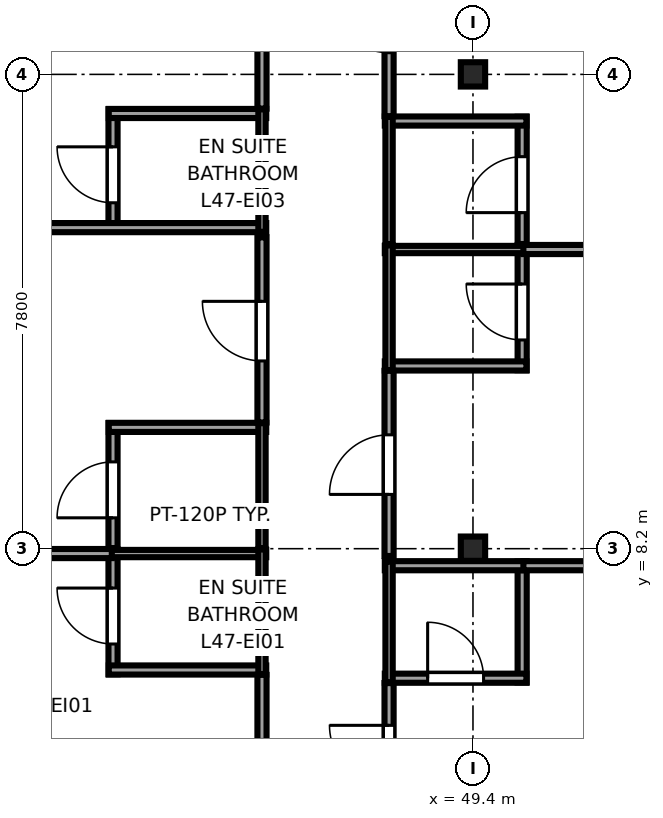
"""IFC4 building model, lengths in metres.
Left out: names, types, materials, properties, quantities, classifications, styles, units other than length and angle.
Written with IfcOpenShell. Run it as: python <this file> out.ifc"""

import sys

from ifc_helpers import new_model, si_unit, direction, frame, frame_2d, origin, origin_2d, place, context, subcontext, project, spatial, rectangle, i_section, extrude, source, transform, mapped, element, fill, save


model = new_model("IFC4")
c1 = context("Model", 3, precision=1e-05, world=origin(), true_north=direction((0.0, 1.0)))
c2 = subcontext(c1, "Body", "Model", "MODEL_VIEW")
j1 = project(units=[si_unit("LENGTHUNIT", "METRE"), si_unit("PLANEANGLEUNIT", "RADIAN")], contexts=[c1])
p1 = place(None, origin())
s1 = spatial("IfcSite", under=j1, at=p1, CompositionType="ELEMENT")
p2 = place(p1, origin())
s2 = spatial("IfcBuilding", under=s1, at=p2, CompositionType="ELEMENT")
p3 = place(p2, frame((0.0, 0.0, 179.0)))
s3 = spatial("IfcBuildingStorey", under=s2, at=p3, CompositionType="ELEMENT", Elevation=179.0)
m1 = source(origin(), c2, "Body", "SweptSolid", [
    extrude(i_section(OverallWidth=0.4, OverallDepth=0.4, WebThickness=0.02, FlangeThickness=0.035, at=origin_2d()), origin(), (0.0, 0.0, 1.0), 3.55),
])
for number, where, z_axis, x_axis in (
    (1, (49.4, 8.2, 0.0), (0.0, 0.0, 1.0), (1.0, 0.0, 0.0)),
    (2, (49.4, 16.0, 0.0), (0.0, 0.0, 1.0), (1.0, 0.0, 0.0)),
):
    element("IfcColumn", number, at=place(p3, frame(where, z_axis=z_axis, x_axis=x_axis)), inside=s3, PredefinedType="COLUMN", context=c2, shape_type="MappedRepresentation", body=[
        mapped(m1, transform((0.0, 0.0, 0.0), x_axis=(1.0, 0.0, 0.0), y_axis=(0.0, 1.0, 0.0), z_axis=(0.0, 0.0, 1.0), scale=1.0)),
    ])
p4 = place(p3, frame((43.48, 6.135, 0.0), z_axis=(0.0, 0.0, 1.0), x_axis=(0.0, 1.0, 0.0)))
e3 = element("IfcWall", 3, at=p4, inside=s3, PredefinedType="PARTITIONING", context=c2, shape_type="SweptSolid", body=[
    extrude(rectangle(XDim=2.055, YDim=0.15, at=frame_2d((1.027, 0.0))), origin(), (0.0, 0.0, 1.0), 3.25),
])
p5 = place(p4, frame((0.498, 0.0, 0.0)))
e4 = element("IfcOpeningElement", 4, at=p5, cuts=e3, PredefinedType="OPENING", context=c2, shape_type="SweptSolid", body=[
    extrude(rectangle(XDim=0.92, YDim=2.01, at=frame_2d((0.46, 1.005))), frame((0.0, 0.085, 0.0), z_axis=(0.0, -1.0, 0.0), x_axis=(1.0, 0.0, 0.0)), (0.0, 0.0, 1.0), 0.17),
])
p6 = place(p3, frame((43.41, 6.205, 0.0), z_axis=(0.0, 0.0, 1.0), x_axis=(1.0, 0.0, 0.0)))
e5 = element("IfcWall", 5, at=p6, inside=s3, PredefinedType="PARTITIONING", context=c2, shape_type="SweptSolid", body=[
    extrude(rectangle(XDim=2.59, YDim=0.15, at=frame_2d((1.295, 0.0))), origin(), (0.0, 0.0, 1.0), 3.25),
])
p7 = place(p3, frame((43.41, 8.12, 0.0), z_axis=(0.0, 0.0, 1.0), x_axis=(1.0, 0.0, 0.0)))
e6 = element("IfcWall", 6, at=p7, inside=s3, PredefinedType="PLUMBINGWALL", context=c2, shape_type="SweptSolid", body=[
    extrude(rectangle(XDim=2.59, YDim=0.12, at=frame_2d((1.295, 0.0))), origin(), (0.0, 0.0, 1.0), 2.638),
])
p8 = place(p3, frame((45.93, 6.135, 0.0), z_axis=(0.0, 0.0, 1.0), x_axis=(0.0, 1.0, 0.0)))
e7 = element("IfcWall", 7, at=p8, inside=s3, PredefinedType="PLUMBINGWALL", context=c2, shape_type="SweptSolid", body=[
    extrude(rectangle(XDim=2.055, YDim=0.12, at=frame_2d((1.027, 0.0))), origin(), (0.0, 0.0, 1.0), 3.25),
])
p9 = place(p3, frame((43.48, 8.21, 0.0), z_axis=(0.0, 0.0, 1.0), x_axis=(0.0, 1.0, 0.0)))
e8 = element("IfcWall", 8, at=p9, inside=s3, PredefinedType="PARTITIONING", context=c2, shape_type="SweptSolid", body=[
    extrude(rectangle(XDim=2.055, YDim=0.15, at=frame_2d((1.027, 0.0))), origin(), (0.0, 0.0, 1.0), 3.25),
])
p10 = place(p9, frame((0.498, 0.0, 0.0)))
e9 = element("IfcOpeningElement", 9, at=p10, cuts=e8, PredefinedType="OPENING", context=c2, shape_type="SweptSolid", body=[
    extrude(rectangle(XDim=0.92, YDim=2.01, at=frame_2d((0.46, 1.005))), frame((0.0, 0.085, 0.0), z_axis=(0.0, -1.0, 0.0), x_axis=(1.0, 0.0, 0.0)), (0.0, 0.0, 1.0), 0.17),
])
p11 = place(p3, frame((43.41, 10.195, 0.0), z_axis=(0.0, 0.0, 1.0), x_axis=(1.0, 0.0, 0.0)))
e10 = element("IfcWall", 10, at=p11, inside=s3, PredefinedType="PARTITIONING", context=c2, shape_type="SweptSolid", body=[
    extrude(rectangle(XDim=2.59, YDim=0.15, at=frame_2d((1.295, 0.0))), origin(), (0.0, 0.0, 1.0), 3.25),
])
p12 = place(p3, frame((45.93, 8.21, 0.0), z_axis=(0.0, 0.0, 1.0), x_axis=(0.0, 1.0, 0.0)))
e11 = element("IfcWall", 11, at=p12, inside=s3, PredefinedType="PLUMBINGWALL", context=c2, shape_type="SweptSolid", body=[
    extrude(rectangle(XDim=2.055, YDim=0.12, at=frame_2d((1.027, 0.0))), origin(), (0.0, 0.0, 1.0), 3.25),
])
p13 = place(p3, frame((43.48, 13.41, 0.0), z_axis=(0.0, 0.0, 1.0), x_axis=(0.0, 1.0, 0.0)))
e12 = element("IfcWall", 12, at=p13, inside=s3, PredefinedType="PARTITIONING", context=c2, shape_type="SweptSolid", body=[
    extrude(rectangle(XDim=2.017, YDim=0.15, at=frame_2d((1.009, 0.0))), origin(), (0.0, 0.0, 1.0), 3.25),
])
p14 = place(p13, frame((0.479, 0.0, 0.0)))
e13 = element("IfcOpeningElement", 13, at=p14, cuts=e12, PredefinedType="OPENING", context=c2, shape_type="SweptSolid", body=[
    extrude(rectangle(XDim=0.92, YDim=2.01, at=frame_2d((0.46, 1.005))), frame((0.0, 0.085, 0.0), z_axis=(0.0, -1.0, 0.0), x_axis=(1.0, 0.0, 0.0)), (0.0, 0.0, 1.0), 0.17),
])
p15 = place(p3, frame((34.65, 13.48, 0.0), z_axis=(0.0, 0.0, 1.0), x_axis=(1.0, 0.0, 0.0)))
e14 = element("IfcWall", 14, at=p15, inside=s3, PredefinedType="PARTITIONING", context=c2, shape_type="SweptSolid", body=[
    extrude(rectangle(XDim=11.35, YDim=0.15, at=frame_2d((5.675, 0.0))), origin(), (0.0, 0.0, 1.0), 3.25),
])
p16 = place(p3, frame((43.41, 15.357, 0.0), z_axis=(0.0, 0.0, 1.0), x_axis=(1.0, 0.0, 0.0)))
e15 = element("IfcWall", 15, at=p16, inside=s3, PredefinedType="PARTITIONING", context=c2, shape_type="SweptSolid", body=[
    extrude(rectangle(XDim=2.59, YDim=0.15, at=frame_2d((1.295, 0.0))), origin(), (0.0, 0.0, 1.0), 3.25),
])
p17 = place(p3, frame((45.93, 13.41, 0.0), z_axis=(0.0, 0.0, 1.0), x_axis=(0.0, 1.0, 0.0)))
e16 = element("IfcWall", 16, at=p17, inside=s3, PredefinedType="PLUMBINGWALL", context=c2, shape_type="SweptSolid", body=[
    extrude(rectangle(XDim=2.017, YDim=0.12, at=frame_2d((1.009, 0.0))), origin(), (0.0, 0.0, 1.0), 3.25),
])
p18 = place(p3, frame((50.209, 6.0, 0.0), z_axis=(0.0, 0.0, 1.0), x_axis=(0.0, 1.0, 0.0)))
e17 = element("IfcWall", 17, at=p18, inside=s3, PredefinedType="PARTITIONING", context=c2, shape_type="SweptSolid", body=[
    extrude(rectangle(XDim=1.99, YDim=0.15, at=frame_2d((0.995, 0.0))), origin(), (0.0, 0.0, 1.0), 3.25),
])
p19 = place(p3, frame((47.95, 6.07, 0.0), z_axis=(0.0, 0.0, 1.0), x_axis=(1.0, 0.0, 0.0)))
e18 = element("IfcWall", 18, at=p19, inside=s3, PredefinedType="PARTITIONING", context=c2, shape_type="SweptSolid", body=[
    extrude(rectangle(XDim=2.329, YDim=0.15, at=frame_2d((1.165, 0.0))), origin(), (0.0, 0.0, 1.0), 3.25),
])
p20 = place(p19, frame((0.705, 0.0, 0.0)))
e19 = element("IfcOpeningElement", 19, at=p20, cuts=e18, PredefinedType="OPENING", context=c2, shape_type="SweptSolid", body=[
    extrude(rectangle(XDim=0.92, YDim=2.01, at=frame_2d((0.46, 1.005))), frame((0.0, 0.085, 0.0), z_axis=(0.0, -1.0, 0.0), x_axis=(1.0, 0.0, 0.0)), (0.0, 0.0, 1.0), 0.17),
])
p21 = place(p3, frame((47.95, 7.92, 0.0), z_axis=(0.0, 0.0, 1.0), x_axis=(1.0, 0.0, 0.0)))
e20 = element("IfcWall", 20, at=p21, inside=s3, PredefinedType="PARTITIONING", context=c2, shape_type="SweptSolid", body=[
    extrude(rectangle(XDim=2.329, YDim=0.15, at=frame_2d((1.165, 0.0))), origin(), (0.0, 0.0, 1.0), 3.25),
])
p22 = place(p3, frame((48.02, 6.0, 0.0), z_axis=(0.0, 0.0, 1.0), x_axis=(0.0, 1.0, 0.0)))
e21 = element("IfcWall", 21, at=p22, inside=s3, PredefinedType="PLUMBINGWALL", context=c2, shape_type="SweptSolid", body=[
    extrude(rectangle(XDim=1.99, YDim=0.12, at=frame_2d((0.995, 0.0))), origin(), (0.0, 0.0, 1.0), 3.25),
])
p23 = place(p3, frame((50.209, 11.135, 0.0), z_axis=(0.0, 0.0, 1.0), x_axis=(0.0, 1.0, 0.0)))
e22 = element("IfcWall", 22, at=p23, inside=s3, PredefinedType="PARTITIONING", context=c2, shape_type="SweptSolid", body=[
    extrude(rectangle(XDim=2.055, YDim=0.15, at=frame_2d((1.027, 0.0))), origin(), (0.0, 0.0, 1.0), 3.25),
])
p24 = place(p23, frame((0.498, 0.0, 0.0)))
e23 = element("IfcOpeningElement", 23, at=p24, cuts=e22, PredefinedType="OPENING", context=c2, shape_type="SweptSolid", body=[
    extrude(rectangle(XDim=0.92, YDim=2.01, at=frame_2d((0.46, 1.005))), frame((0.0, 0.085, 0.0), z_axis=(0.0, -1.0, 0.0), x_axis=(1.0, 0.0, 0.0)), (0.0, 0.0, 1.0), 0.17),
])
p25 = place(p3, frame((47.95, 11.205, 0.0), z_axis=(0.0, 0.0, 1.0), x_axis=(1.0, 0.0, 0.0)))
e24 = element("IfcWall", 24, at=p25, inside=s3, PredefinedType="PARTITIONING", context=c2, shape_type="SweptSolid", body=[
    extrude(rectangle(XDim=2.329, YDim=0.15, at=frame_2d((1.165, 0.0))), origin(), (0.0, 0.0, 1.0), 3.25),
])
p26 = place(p3, frame((47.95, 13.12, 0.0), z_axis=(0.0, 0.0, 1.0), x_axis=(1.0, 0.0, 0.0)))
e25 = element("IfcWall", 25, at=p26, inside=s3, PredefinedType="PLUMBINGWALL", context=c2, shape_type="SweptSolid", body=[
    extrude(rectangle(XDim=2.329, YDim=0.12, at=frame_2d((1.165, 0.0))), origin(), (0.0, 0.0, 1.0), 3.25),
])
p27 = place(p3, frame((48.02, 11.135, 0.0), z_axis=(0.0, 0.0, 1.0), x_axis=(0.0, 1.0, 0.0)))
e26 = element("IfcWall", 26, at=p27, inside=s3, PredefinedType="PLUMBINGWALL", context=c2, shape_type="SweptSolid", body=[
    extrude(rectangle(XDim=2.055, YDim=0.12, at=frame_2d((1.027, 0.0))), origin(), (0.0, 0.0, 1.0), 3.25),
])
p28 = place(p3, frame((50.209, 13.21, 0.0), z_axis=(0.0, 0.0, 1.0), x_axis=(0.0, 1.0, 0.0)))
e27 = element("IfcWall", 27, at=p28, inside=s3, PredefinedType="PARTITIONING", context=c2, shape_type="SweptSolid", body=[
    extrude(rectangle(XDim=2.093, YDim=0.15, at=frame_2d((1.046, 0.0))), origin(), (0.0, 0.0, 1.0), 3.25),
])
p29 = place(p28, frame((0.517, 0.0, 0.0)))
e28 = element("IfcOpeningElement", 28, at=p29, cuts=e27, PredefinedType="OPENING", context=c2, shape_type="SweptSolid", body=[
    extrude(rectangle(XDim=0.92, YDim=2.01, at=frame_2d((0.46, 1.005))), frame((0.0, 0.085, 0.0), z_axis=(0.0, -1.0, 0.0), x_axis=(1.0, 0.0, 0.0)), (0.0, 0.0, 1.0), 0.17),
])
p30 = place(p3, frame((47.95, 15.233, 0.0), z_axis=(0.0, 0.0, 1.0), x_axis=(1.0, 0.0, 0.0)))
e29 = element("IfcWall", 29, at=p30, inside=s3, PredefinedType="PARTITIONING", context=c2, shape_type="SweptSolid", body=[
    extrude(rectangle(XDim=2.329, YDim=0.15, at=frame_2d((1.165, 0.0))), origin(), (0.0, 0.0, 1.0), 3.25),
])
p31 = place(p3, frame((48.02, 13.21, 0.0), z_axis=(0.0, 0.0, 1.0), x_axis=(0.0, 1.0, 0.0)))
e30 = element("IfcWall", 30, at=p31, inside=s3, PredefinedType="PLUMBINGWALL", context=c2, shape_type="SweptSolid", body=[
    extrude(rectangle(XDim=2.093, YDim=0.12, at=frame_2d((1.046, 0.0))), origin(), (0.0, 0.0, 1.0), 3.25),
])
p32 = place(p3, frame((45.93, 3.005, 0.0), z_axis=(0.0, 0.0, 1.0), x_axis=(0.0, 1.0, 0.0)))
e31 = element("IfcWall", 31, at=p32, inside=s3, PredefinedType="PARTITIONING", context=c2, shape_type="SweptSolid", body=[
    extrude(rectangle(XDim=3.12, YDim=0.15, at=frame_2d((1.56, 0.0))), origin(), (0.0, 0.0, 1.0), 3.25),
])
p33 = place(p32, frame((1.077, 0.0, 0.0)))
e32 = element("IfcOpeningElement", 32, at=p33, cuts=e31, PredefinedType="OPENING", context=c2, shape_type="SweptSolid", body=[
    extrude(rectangle(XDim=0.98, YDim=2.12, at=frame_2d((0.49, 1.06))), frame((0.0, 0.085, 0.0), z_axis=(0.0, -1.0, 0.0), x_axis=(1.0, 0.0, 0.0)), (0.0, 0.0, 1.0), 0.17),
])
p34 = place(p3, frame((34.65, 8.12, 0.0), z_axis=(0.0, 0.0, 1.0), x_axis=(1.0, 0.0, 0.0)))
e33 = element("IfcWall", 33, at=p34, inside=s3, PredefinedType="PARTITIONING", context=c2, shape_type="SweptSolid", body=[
    extrude(rectangle(XDim=8.81, YDim=0.15, at=frame_2d((4.405, 0.0))), origin(), (0.0, 0.0, 1.0), 2.638),
])
p35 = place(p3, frame((45.93, 10.275, 0.0), z_axis=(0.0, 0.0, 1.0), x_axis=(0.0, 1.0, 0.0)))
e34 = element("IfcWall", 34, at=p35, inside=s3, PredefinedType="PARTITIONING", context=c2, shape_type="SweptSolid", body=[
    extrude(rectangle(XDim=3.045, YDim=0.15, at=frame_2d((1.522, 0.0))), origin(), (0.0, 0.0, 1.0), 3.25),
])
p36 = place(p35, frame((1.012, 0.0, 0.0)))
e35 = element("IfcOpeningElement", 35, at=p36, cuts=e34, PredefinedType="OPENING", context=c2, shape_type="SweptSolid", body=[
    extrude(rectangle(XDim=0.98, YDim=2.12, at=frame_2d((0.49, 1.06))), frame((0.0, 0.085, 0.0), z_axis=(0.0, -1.0, 0.0), x_axis=(1.0, 0.0, 0.0)), (0.0, 0.0, 1.0), 0.17),
])
p37 = place(p3, frame((45.93, 15.437, 0.0), z_axis=(0.0, 0.0, 1.0), x_axis=(0.0, 1.0, 0.0)))
e36 = element("IfcWall", 36, at=p37, inside=s3, PredefinedType="PARTITIONING", context=c2, shape_type="SweptSolid", body=[
    extrude(rectangle(XDim=2.983, YDim=0.15, at=frame_2d((1.491, 0.0))), origin(), (0.0, 0.0, 1.0), 3.25),
])
p38 = place(p37, frame((0.981, 0.0, 0.0)))
e37 = element("IfcOpeningElement", 37, at=p38, cuts=e36, PredefinedType="OPENING", context=c2, shape_type="SweptSolid", body=[
    extrude(rectangle(XDim=0.98, YDim=2.12, at=frame_2d((0.49, 1.06))), frame((0.0, 0.085, 0.0), z_axis=(0.0, -1.0, 0.0), x_axis=(1.0, 0.0, 0.0)), (0.0, 0.0, 1.0), 0.17),
])
p39 = place(p3, frame((48.02, 3.005, 0.0), z_axis=(0.0, 0.0, 1.0), x_axis=(0.0, 1.0, 0.0)))
e38 = element("IfcWall", 38, at=p39, inside=s3, PredefinedType="PARTITIONING", context=c2, shape_type="SweptSolid", body=[
    extrude(rectangle(XDim=2.985, YDim=0.15, at=frame_2d((1.493, 0.0))), origin(), (0.0, 0.0, 1.0), 3.25),
])
p40 = place(p39, frame((1.31, 0.0, 0.0)))
e39 = element("IfcOpeningElement", 39, at=p40, cuts=e38, PredefinedType="OPENING", context=c2, shape_type="SweptSolid", body=[
    extrude(rectangle(XDim=0.98, YDim=2.12, at=frame_2d((0.49, 1.06))), frame((0.0, 0.085, 0.0), z_axis=(0.0, -1.0, 0.0), x_axis=(1.0, 0.0, 0.0)), (0.0, 0.0, 1.0), 0.17),
])
p41 = place(p3, frame((50.229, 7.92, 0.0), z_axis=(0.0, 0.0, 1.0), x_axis=(1.0, 0.0, 0.0)))
e40 = element("IfcWall", 40, at=p41, inside=s3, PredefinedType="PARTITIONING", context=c2, shape_type="SweptSolid", body=[
    extrude(rectangle(XDim=3.766, YDim=0.15, at=frame_2d((1.883, 0.0))), origin(), (0.0, 0.0, 1.0), 3.25),
])
p42 = place(p3, frame((48.02, 8.08, 0.0), z_axis=(0.0, 0.0, 1.0), x_axis=(0.0, 1.0, 0.0)))
e41 = element("IfcWall", 41, at=p42, inside=s3, PredefinedType="PARTITIONING", context=c2, shape_type="SweptSolid", body=[
    extrude(rectangle(XDim=3.045, YDim=0.15, at=frame_2d((1.522, 0.0))), origin(), (0.0, 0.0, 1.0), 3.25),
])
p43 = place(p42, frame((1.012, 0.0, 0.0)))
e42 = element("IfcOpeningElement", 42, at=p43, cuts=e41, PredefinedType="OPENING", context=c2, shape_type="SweptSolid", body=[
    extrude(rectangle(XDim=0.98, YDim=2.12, at=frame_2d((0.49, 1.06))), frame((0.0, 0.085, 0.0), z_axis=(0.0, -1.0, 0.0), x_axis=(1.0, 0.0, 0.0)), (0.0, 0.0, 1.0), 0.17),
])
p44 = place(p3, frame((50.229, 13.12, 0.0), z_axis=(0.0, 0.0, 1.0), x_axis=(1.0, 0.0, 0.0)))
e43 = element("IfcWall", 43, at=p44, inside=s3, PredefinedType="PARTITIONING", context=c2, shape_type="SweptSolid", body=[
    extrude(rectangle(XDim=3.766, YDim=0.15, at=frame_2d((1.883, 0.0))), origin(), (0.0, 0.0, 1.0), 3.25),
])
p45 = place(p3, frame((48.02, 15.313, 0.0), z_axis=(0.0, 0.0, 1.0), x_axis=(0.0, 1.0, 0.0)))
e44 = element("IfcWall", 44, at=p45, inside=s3, PredefinedType="PARTITIONING", context=c2, shape_type="SweptSolid", body=[
    extrude(rectangle(XDim=3.107, YDim=0.15, at=frame_2d((1.553, 0.0))), origin(), (0.0, 0.0, 1.0), 3.25),
])
p46 = place(p45, frame((1.043, 0.0, 0.0)))
e45 = element("IfcOpeningElement", 45, at=p46, cuts=e44, PredefinedType="OPENING", context=c2, shape_type="SweptSolid", body=[
    extrude(rectangle(XDim=0.98, YDim=2.12, at=frame_2d((0.49, 1.06))), frame((0.0, 0.085, 0.0), z_axis=(0.0, -1.0, 0.0), x_axis=(1.0, 0.0, 0.0)), (0.0, 0.0, 1.0), 0.17),
])
m2 = source(origin(), c2, "Body", "SweptSolid", [
    extrude(rectangle(XDim=0.92, YDim=2.01, at=frame_2d((0.46, 1.005))), frame((0.0, 0.025, 0.0), z_axis=(0.0, -1.0, 0.0), x_axis=(1.0, 0.0, 0.0)), (0.0, 0.0, 1.0), 0.05),
])
p47 = place(p5, origin())
e46 = element("IfcDoor", 46, at=p47, inside=s3, OperationType="SINGLE_SWING_RIGHT", PredefinedType="DOOR", context=c2, shape_type="MappedRepresentation", body=[
    mapped(m2, transform((0.0, 0.0, 0.0), x_axis=(1.0, 0.0, 0.0), y_axis=(0.0, 1.0, 0.0), z_axis=(0.0, 0.0, 1.0), scale=1.0)),
])
fill(e4, e46)
p48 = place(p10, origin())
e47 = element("IfcDoor", 47, at=p48, inside=s3, OperationType="SINGLE_SWING_LEFT", PredefinedType="DOOR", context=c2, shape_type="MappedRepresentation", body=[
    mapped(m2, transform((0.0, 0.0, 0.0), x_axis=(1.0, 0.0, 0.0), y_axis=(0.0, 1.0, 0.0), z_axis=(0.0, 0.0, 1.0), scale=1.0)),
])
fill(e9, e47)
p49 = place(p14, origin())
e48 = element("IfcDoor", 48, at=p49, inside=s3, OperationType="SINGLE_SWING_RIGHT", PredefinedType="DOOR", context=c2, shape_type="MappedRepresentation", body=[
    mapped(m2, transform((0.0, 0.0, 0.0), x_axis=(1.0, 0.0, 0.0), y_axis=(0.0, 1.0, 0.0), z_axis=(0.0, 0.0, 1.0), scale=1.0)),
])
fill(e13, e48)
p50 = place(p20, origin())
e49 = element("IfcDoor", 49, at=p50, inside=s3, OperationType="SINGLE_SWING_LEFT", PredefinedType="DOOR", context=c2, shape_type="MappedRepresentation", body=[
    mapped(m2, transform((0.0, 0.0, 0.0), x_axis=(1.0, 0.0, 0.0), y_axis=(0.0, 1.0, 0.0), z_axis=(0.0, 0.0, 1.0), scale=1.0)),
])
fill(e19, e49)
p51 = place(p24, origin())
e50 = element("IfcDoor", 50, at=p51, inside=s3, OperationType="SINGLE_SWING_RIGHT", PredefinedType="DOOR", context=c2, shape_type="MappedRepresentation", body=[
    mapped(m2, transform((0.0, 0.0, 0.0), x_axis=(1.0, 0.0, 0.0), y_axis=(0.0, 1.0, 0.0), z_axis=(0.0, 0.0, 1.0), scale=1.0)),
])
fill(e23, e50)
p52 = place(p29, origin())
e51 = element("IfcDoor", 51, at=p52, inside=s3, OperationType="SINGLE_SWING_LEFT", PredefinedType="DOOR", context=c2, shape_type="MappedRepresentation", body=[
    mapped(m2, transform((0.0, 0.0, 0.0), x_axis=(1.0, 0.0, 0.0), y_axis=(0.0, 1.0, 0.0), z_axis=(0.0, 0.0, 1.0), scale=1.0)),
])
fill(e28, e51)
m3 = source(origin(), c2, "Body", "SweptSolid", [
    extrude(rectangle(XDim=0.98, YDim=2.12, at=frame_2d((0.49, 1.06))), frame((0.0, 0.025, 0.0), z_axis=(0.0, -1.0, 0.0), x_axis=(1.0, 0.0, 0.0)), (0.0, 0.0, 1.0), 0.05),
])
p53 = place(p36, origin())
e52 = element("IfcDoor", 52, at=p53, inside=s3, OperationType="SINGLE_SWING_RIGHT", PredefinedType="DOOR", context=c2, shape_type="MappedRepresentation", body=[
    mapped(m3, transform((0.0, 0.0, 0.0), x_axis=(1.0, 0.0, 0.0), y_axis=(0.0, 1.0, 0.0), z_axis=(0.0, 0.0, 1.0), scale=1.0)),
])
fill(e35, e52)
p54 = place(p40, origin())
e53 = element("IfcDoor", 53, at=p54, inside=s3, OperationType="SINGLE_SWING_RIGHT", PredefinedType="DOOR", context=c2, shape_type="MappedRepresentation", body=[
    mapped(m3, transform((0.0, 0.0, 0.0), x_axis=(1.0, 0.0, 0.0), y_axis=(0.0, 1.0, 0.0), z_axis=(0.0, 0.0, 1.0), scale=1.0)),
])
fill(e39, e53)
p55 = place(p43, origin())
e54 = element("IfcDoor", 54, at=p55, inside=s3, OperationType="SINGLE_SWING_LEFT", PredefinedType="DOOR", context=c2, shape_type="MappedRepresentation", body=[
    mapped(m3, transform((0.0, 0.0, 0.0), x_axis=(1.0, 0.0, 0.0), y_axis=(0.0, 1.0, 0.0), z_axis=(0.0, 0.0, 1.0), scale=1.0)),
])
fill(e42, e54)
p56 = place(p46, origin())
e55 = element("IfcDoor", 55, at=p56, inside=s3, OperationType="SINGLE_SWING_RIGHT", PredefinedType="DOOR", context=c2, shape_type="MappedRepresentation", body=[
    mapped(m3, transform((0.0, 0.0, 0.0), x_axis=(1.0, 0.0, 0.0), y_axis=(0.0, 1.0, 0.0), z_axis=(0.0, 0.0, 1.0), scale=1.0)),
])
fill(e45, e55)
save(model, sys.argv[1])
